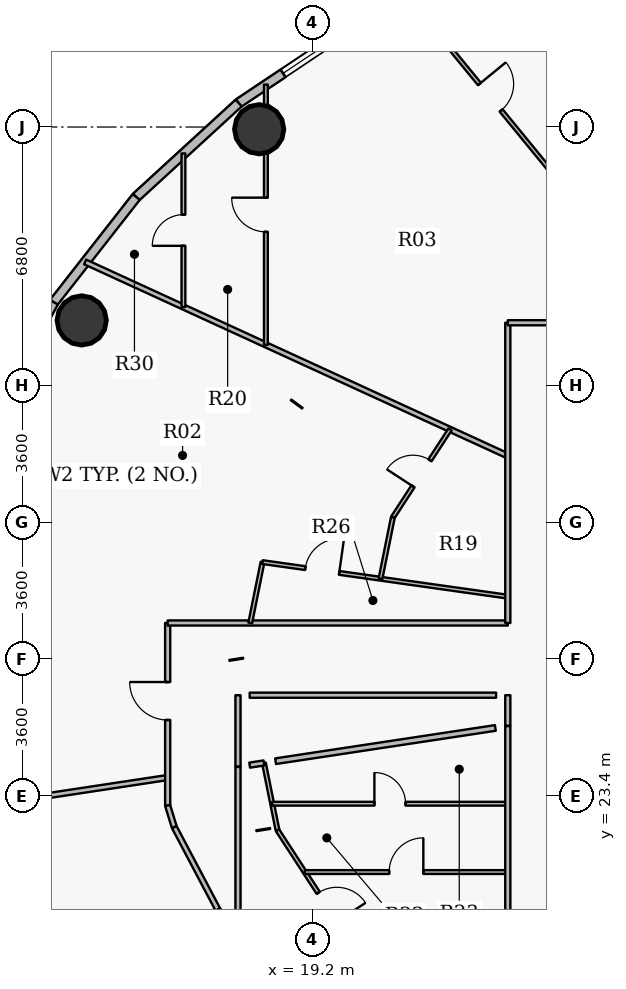
"""IFC4 building model, lengths in metres.
Left out: names, types, materials, properties, quantities, classifications, styles, units other than length and angle.
Written with IfcOpenShell. Run it as: python <this file> out.ifc"""

import sys

from ifc_helpers import new_model, si_unit, direction, frame, frame_2d, origin, origin_2d, place, context, subcontext, project, spatial, rectangle, hollow_circle, extrude, source, transform, mapped, element, fill, save


model = new_model("IFC4")
c1 = context("Model", 3, precision=1e-05, world=origin(), true_north=direction((0.0, 1.0)))
c2 = subcontext(c1, "Body", "Model", "MODEL_VIEW")
j1 = project(units=[si_unit("LENGTHUNIT", "METRE"), si_unit("PLANEANGLEUNIT", "RADIAN")], contexts=[c1])
p1 = place(None, origin())
s1 = spatial("IfcSite", under=j1, at=p1, CompositionType="ELEMENT")
p2 = place(p1, origin())
s2 = spatial("IfcBuilding", under=s1, at=p2, CompositionType="ELEMENT")
p3 = place(p2, frame((0.0, 0.0, 156.15)))
s3 = spatial("IfcBuildingStorey", under=s2, at=p3, CompositionType="ELEMENT", Elevation=156.15)
for number, where, z_axis, x_axis in (
    (1, (17.808, 40.942, 0.0), (0.0, 0.0, 1.0), (1.0, 0.0, 0.0)),
    (2, (13.137, 35.911, 0.0), (0.0, 0.0, 1.0), (1.0, 0.0, 0.0)),
):
    element("IfcColumn", number, at=place(p3, frame(where, z_axis=z_axis, x_axis=x_axis)), inside=s3, PredefinedType="COLUMN", context=c2, shape_type="SweptSolid", body=[
        extrude(hollow_circle(Radius=0.65, WallThickness=0.04, at=origin_2d()), origin(), (0.0, 0.0, 1.0), 3.75),
    ])
p4 = place(p3, frame((17.268, 41.631, 0.0), z_axis=(0.0, 0.0, 1.0), x_axis=(0.831228998277, 0.555930168657, 0.0)))
e3 = element("IfcWall", 3, at=p4, inside=s3, PredefinedType="SOLIDWALL", context=c2, shape_type="SweptSolid", body=[
    extrude(rectangle(XDim=3.8, YDim=0.24, at=frame_2d((1.9, 0.0))), origin(), (0.0, 0.0, 1.0), 3.5),
])
p5 = place(p4, frame((1.405, 0.0, 0.9)))
e4 = element("IfcOpeningElement", 4, at=p5, cuts=e3, PredefinedType="OPENING", context=c2, shape_type="SweptSolid", body=[
    extrude(rectangle(XDim=1.25, YDim=1.65, at=origin_2d()), frame((0.625, 0.13, 0.825), z_axis=(0.0, -1.0, 0.0), x_axis=(1.0, 0.0, 0.0)), (0.0, 0.0, 1.0), 0.26),
])
p6 = place(p3, frame((14.572, 39.158, 0.0), z_axis=(0.0, 0.0, 1.0), x_axis=(0.737076565834, 0.675809245349, 0.0)))
e5 = element("IfcWall", 5, at=p6, inside=s3, PredefinedType="SOLIDWALL", context=c2, shape_type="SweptSolid", body=[
    extrude(rectangle(XDim=3.658, YDim=0.24, at=frame_2d((1.829, 0.0))), origin(), (0.0, 0.0, 1.0), 3.5),
])
p7 = place(p3, frame((12.404, 36.388, 0.0), z_axis=(0.0, 0.0, 1.0), x_axis=(0.616287674549, 0.787521112224, 0.0)))
e6 = element("IfcWall", 6, at=p7, inside=s3, PredefinedType="SOLIDWALL", context=c2, shape_type="SweptSolid", body=[
    extrude(rectangle(XDim=3.517, YDim=0.24, at=frame_2d((1.759, 0.0))), origin(), (0.0, 0.0, 1.0), 3.5),
])
p8 = place(p3, frame((10.817, 33.389, 0.0), z_axis=(0.0, 0.0, 1.0), x_axis=(0.467586874938, 0.88394712194, 0.0)))
e7 = element("IfcWall", 7, at=p8, inside=s3, PredefinedType="SOLIDWALL", context=c2, shape_type="SweptSolid", body=[
    extrude(rectangle(XDim=3.393, YDim=0.24, at=frame_2d((1.697, 0.0))), origin(), (0.0, 0.0, 1.0), 3.5),
])
p9 = place(p8, frame((1.172, 0.0, 0.0)))
e8 = element("IfcOpeningElement", 8, at=p9, cuts=e7, PredefinedType="OPENING", context=c2, shape_type="SweptSolid", body=[
    extrude(rectangle(XDim=1.05, YDim=2.15, at=origin_2d()), frame((0.525, 0.13, 1.075), z_axis=(0.0, -1.0, 0.0), x_axis=(1.0, 0.0, 0.0)), (0.0, 0.0, 1.0), 0.26),
])
p10 = place(p3, frame((12.404, 17.612, 0.0), z_axis=(0.0, 0.0, 1.0), x_axis=(-0.467586874938, 0.88394712194, 0.0)))
e9 = element("IfcWall", 9, at=p10, inside=s3, PredefinedType="SOLIDWALL", context=c2, shape_type="SweptSolid", body=[
    extrude(rectangle(XDim=3.393, YDim=0.24, at=frame_2d((1.697, 0.0))), origin(), (0.0, 0.0, 1.0), 3.5),
])
p11 = place(p10, frame((1.072, 0.0, 0.9)))
e10 = element("IfcOpeningElement", 10, at=p11, cuts=e9, PredefinedType="OPENING", context=c2, shape_type="SweptSolid", body=[
    extrude(rectangle(XDim=1.25, YDim=1.65, at=origin_2d()), frame((0.625, 0.13, 0.825), z_axis=(0.0, -1.0, 0.0), x_axis=(1.0, 0.0, 0.0)), (0.0, 0.0, 1.0), 0.26),
])
p12 = place(p3, frame((10.057, 23.075, 0.0), z_axis=(0.0, 0.0, 1.0), x_axis=(0.988756022356, 0.14953771516, 0.0)))
e11 = element("IfcWall", 11, at=p12, inside=s3, PredefinedType="PARTITIONING", context=c2, shape_type="SweptSolid", body=[
    extrude(rectangle(XDim=5.404, YDim=0.135, at=frame_2d((2.702, 0.0))), origin(), (0.0, 0.0, 1.0), 2.935),
])
p13 = place(p3, frame((13.229, 37.45, 0.0), z_axis=(0.0, 0.0, 1.0), x_axis=(0.908867611309, -0.417084721746, 0.0)))
e12 = element("IfcWall", 12, at=p13, inside=s3, PredefinedType="PARTITIONING", context=c2, shape_type="SweptSolid", body=[
    extrude(rectangle(XDim=12.237, YDim=0.135, at=frame_2d((6.118, 0.0))), origin(), (0.0, 0.0, 1.0), 2.935),
])
p14 = place(p3, frame((15.4, 23.146, 0.0), z_axis=(0.0, 0.0, 1.0), x_axis=(0.0, 1.0, 0.0)))
e13 = element("IfcWall", 13, at=p14, inside=s3, PredefinedType="PARTITIONING", context=c2, shape_type="SweptSolid", body=[
    extrude(rectangle(XDim=4.804, YDim=0.135, at=frame_2d((2.402, 0.0))), origin(), (0.0, 0.0, 1.0), 2.935),
])
p15 = place(p14, frame((2.251, 0.0, 0.0)))
e14 = element("IfcOpeningElement", 14, at=p15, cuts=e13, PredefinedType="OPENING", context=c2, shape_type="SweptSolid", body=[
    extrude(rectangle(XDim=1.0, YDim=2.15, at=origin_2d()), frame((0.5, 0.078, 1.075), z_axis=(0.0, -1.0, 0.0), x_axis=(1.0, 0.0, 0.0)), (0.0, 0.0, 1.0), 0.155),
])
p16 = place(p3, frame((15.4, 23.146, 0.0), z_axis=(0.0, 0.0, 1.0), x_axis=(0.293335154151, -0.956009669061, 0.0)))
e15 = element("IfcWall", 15, at=p16, inside=s3, PredefinedType="PARTITIONING", context=c2, shape_type="SweptSolid", body=[
    extrude(rectangle(XDim=0.594, YDim=0.135, at=frame_2d((0.297, 0.0))), origin(), (0.0, 0.0, 1.0), 3.5),
])
p17 = place(p3, frame((15.4, 27.95, 0.0), z_axis=(0.0, 0.0, 1.0), x_axis=(1.0, 0.0, 0.0)))
e16 = element("IfcWall", 16, at=p17, inside=s3, PredefinedType="PARTITIONING", context=c2, shape_type="SweptSolid", body=[
    extrude(rectangle(XDim=8.95, YDim=0.135, at=frame_2d((4.475, 0.0))), origin(), (0.0, 0.0, 1.0), 3.5),
])
p18 = place(p3, frame((15.574, 22.578, 0.0), z_axis=(0.0, 0.0, 1.0), x_axis=(0.46757196543, -0.883955008552, 0.0)))
e17 = element("IfcWall", 17, at=p18, inside=s3, PredefinedType="PARTITIONING", context=c2, shape_type="SweptSolid", body=[
    extrude(rectangle(XDim=2.451, YDim=0.135, at=frame_2d((1.226, 0.0))), origin(), (0.0, 0.0, 1.0), 2.935),
])
p19 = place(p3, frame((15.815, 36.263, 0.0), z_axis=(0.0, 0.0, 1.0), x_axis=(0.0, 1.0, 0.0)))
e18 = element("IfcWall", 18, at=p19, inside=s3, PredefinedType="PARTITIONING", context=c2, shape_type="SweptSolid", body=[
    extrude(rectangle(XDim=4.042, YDim=0.1, at=frame_2d((2.021, 0.0))), origin(), (0.0, 0.0, 1.0), 2.935),
])
p20 = place(p19, frame((1.611, 0.0, 0.0)))
e19 = element("IfcOpeningElement", 19, at=p20, cuts=e18, PredefinedType="OPENING", context=c2, shape_type="SweptSolid", body=[
    extrude(rectangle(XDim=0.82, YDim=2.1, at=origin_2d()), frame((0.41, 0.06, 1.05), z_axis=(0.0, -1.0, 0.0), x_axis=(1.0, 0.0, 0.0)), (0.0, 0.0, 1.0), 0.12),
])
p21 = place(p3, frame((16.72, 20.411, 0.0), z_axis=(0.0, 0.0, 1.0), x_axis=(0.616377221056, -0.787451027914, 0.0)))
e20 = element("IfcWall", 20, at=p21, inside=s3, PredefinedType="PARTITIONING", context=c2, shape_type="SweptSolid", body=[
    extrude(rectangle(XDim=0.859, YDim=0.135, at=frame_2d((0.43, 0.0))), origin(), (0.0, 0.0, 1.0), 3.5),
])
p22 = place(p3, frame((17.25, 19.734, 0.0), z_axis=(0.0, 0.0, 1.0), x_axis=(0.0, 1.0, 0.0)))
e21 = element("IfcWall", 21, at=p22, inside=s3, PredefinedType="PARTITIONING", context=c2, shape_type="SweptSolid", body=[
    extrude(rectangle(XDim=4.429, YDim=0.135, at=frame_2d((2.215, 0.0))), origin(), (0.0, 0.0, 1.0), 2.935),
])
p23 = place(p3, frame((17.572, 27.95, 0.0), z_axis=(0.0, 0.0, 1.0), x_axis=(0.19821259699, 0.98015905158, 0.0)))
e22 = element("IfcWall", 22, at=p23, inside=s3, PredefinedType="PARTITIONING", context=c2, shape_type="SweptSolid", body=[
    extrude(rectangle(XDim=1.635, YDim=0.1, at=frame_2d((0.817, 0.0))), origin(), (0.0, 0.0, 1.0), 3.5),
])
p24 = place(p3, frame((17.896, 29.552, 0.0), z_axis=(0.0, 0.0, 1.0), x_axis=(0.990212218954, -0.139569915938, 0.0)))
e23 = element("IfcWall", 23, at=p24, inside=s3, PredefinedType="PARTITIONING", context=c2, shape_type="SweptSolid", body=[
    extrude(rectangle(XDim=6.518, YDim=0.1, at=frame_2d((3.259, 0.0))), origin(), (0.0, 0.0, 1.0), 3.5),
])
p25 = place(p24, frame((1.137, 0.0, 0.0)))
e24 = element("IfcOpeningElement", 24, at=p25, cuts=e23, PredefinedType="OPENING", context=c2, shape_type="SweptSolid", body=[
    extrude(rectangle(XDim=0.9, YDim=2.1, at=origin_2d()), frame((0.45, 0.06, 1.05), z_axis=(0.0, -1.0, 0.0), x_axis=(1.0, 0.0, 0.0)), (0.0, 0.0, 1.0), 0.12),
])
p26 = place(p3, frame((17.933, 24.267, 0.0), z_axis=(0.0, 0.0, 1.0), x_axis=(0.198166528342, -0.980168366682, 0.0)))
e25 = element("IfcWall", 25, at=p26, inside=s3, PredefinedType="PARTITIONING", context=c2, shape_type="SweptSolid", body=[
    extrude(rectangle(XDim=1.809, YDim=0.1, at=frame_2d((0.904, 0.0))), origin(), (0.0, 0.0, 1.0), 2.935),
])
p27 = place(p3, frame((17.984, 35.267, 0.0), z_axis=(0.0, 0.0, 1.0), x_axis=(0.0, 1.0, 0.0)))
e26 = element("IfcWall", 26, at=p27, inside=s3, PredefinedType="PARTITIONING", context=c2, shape_type="SweptSolid", body=[
    extrude(rectangle(XDim=6.848, YDim=0.1, at=frame_2d((3.424, 0.0))), origin(), (0.0, 0.0, 1.0), 2.935),
])
p28 = place(p27, frame((2.974, 0.0, 0.0)))
e27 = element("IfcOpeningElement", 27, at=p28, cuts=e26, PredefinedType="OPENING", context=c2, shape_type="SweptSolid", body=[
    extrude(rectangle(XDim=0.9, YDim=2.1, at=origin_2d()), frame((0.45, 0.06, 1.05), z_axis=(0.0, -1.0, 0.0), x_axis=(1.0, 0.0, 0.0)), (0.0, 0.0, 1.0), 0.12),
])
p29 = place(p3, frame((18.15, 23.195, 0.0), z_axis=(0.0, 0.0, 1.0), x_axis=(1.0, 0.0, 0.0)))
e28 = element("IfcWall", 28, at=p29, inside=s3, PredefinedType="PARTITIONING", context=c2, shape_type="SweptSolid", body=[
    extrude(rectangle(XDim=6.2, YDim=0.1, at=frame_2d((3.1, 0.0))), origin(), (0.0, 0.0, 1.0), 2.935),
])
p30 = place(p29, frame((2.69, 0.0, 0.0)))
e29 = element("IfcOpeningElement", 29, at=p30, cuts=e28, PredefinedType="OPENING", context=c2, shape_type="SweptSolid", body=[
    extrude(rectangle(XDim=0.82, YDim=2.1, at=origin_2d()), frame((0.41, 0.06, 1.05), z_axis=(0.0, -1.0, 0.0), x_axis=(1.0, 0.0, 0.0)), (0.0, 0.0, 1.0), 0.12),
])
p31 = place(p3, frame((18.291, 22.494, 0.0), z_axis=(0.0, 0.0, 1.0), x_axis=(0.545405921784, -0.838172047066, 0.0)))
e30 = element("IfcWall", 30, at=p31, inside=s3, PredefinedType="PARTITIONING", context=c2, shape_type="SweptSolid", body=[
    extrude(rectangle(XDim=4.849, YDim=0.1, at=frame_2d((2.425, 0.0))), origin(), (0.0, 0.0, 1.0), 2.935),
])
p32 = place(p31, frame((1.962, 0.0, 0.0)))
e31 = element("IfcOpeningElement", 31, at=p32, cuts=e30, PredefinedType="OPENING", context=c2, shape_type="SweptSolid", body=[
    extrude(rectangle(XDim=0.9, YDim=2.1, at=origin_2d()), frame((0.45, 0.06, 1.05), z_axis=(0.0, -1.0, 0.0), x_axis=(1.0, 0.0, 0.0)), (0.0, 0.0, 1.0), 0.12),
])
p33 = place(p3, frame((19.005, 21.397, 0.0), z_axis=(0.0, 0.0, 1.0), x_axis=(1.0, 0.0, 0.0)))
e32 = element("IfcWall", 32, at=p33, inside=s3, PredefinedType="PARTITIONING", context=c2, shape_type="SweptSolid", body=[
    extrude(rectangle(XDim=5.345, YDim=0.1, at=frame_2d((2.672, 0.0))), origin(), (0.0, 0.0, 1.0), 3.5),
])
p34 = place(p33, frame((2.222, 0.0, 0.0)))
e33 = element("IfcOpeningElement", 33, at=p34, cuts=e32, PredefinedType="OPENING", context=c2, shape_type="SweptSolid", body=[
    extrude(rectangle(XDim=0.9, YDim=2.1, at=origin_2d()), frame((0.45, 0.06, 1.05), z_axis=(0.0, -1.0, 0.0), x_axis=(1.0, 0.0, 0.0)), (0.0, 0.0, 1.0), 0.12),
])
p35 = place(p3, frame((21.0, 29.115, 0.0), z_axis=(0.0, 0.0, 1.0), x_axis=(0.198219197437, 0.980157716782, 0.0)))
e34 = element("IfcWall", 34, at=p35, inside=s3, PredefinedType="PARTITIONING", context=c2, shape_type="SweptSolid", body=[
    extrude(rectangle(XDim=1.652, YDim=0.1, at=frame_2d((0.826, 0.0))), origin(), (0.0, 0.0, 1.0), 3.5),
])
p36 = place(p3, frame((21.327, 30.733, 0.0), z_axis=(0.0, 0.0, 1.0), x_axis=(0.545365017792, 0.838198662233, 0.0)))
e35 = element("IfcWall", 35, at=p36, inside=s3, PredefinedType="PARTITIONING", context=c2, shape_type="SweptSolid", body=[
    extrude(rectangle(XDim=2.756, YDim=0.1, at=frame_2d((1.378, 0.0))), origin(), (0.0, 0.0, 1.0), 2.935),
])
p37 = place(p36, frame((0.968, 0.0, 0.0)))
e36 = element("IfcOpeningElement", 36, at=p37, cuts=e35, PredefinedType="OPENING", context=c2, shape_type="SweptSolid", body=[
    extrude(rectangle(XDim=0.82, YDim=2.1, at=origin_2d()), frame((0.41, 0.06, 1.05), z_axis=(0.0, -1.0, 0.0), x_axis=(1.0, 0.0, 0.0)), (0.0, 0.0, 1.0), 0.12),
])
p38 = place(p3, frame((21.756, 44.387, 0.0), z_axis=(0.0, 0.0, 1.0), x_axis=(0.633727642201, -0.773556252325, 0.0)))
e37 = element("IfcWall", 37, at=p38, inside=s3, PredefinedType="PARTITIONING", context=c2, shape_type="SweptSolid", body=[
    extrude(rectangle(XDim=6.729, YDim=0.1, at=frame_2d((3.365, 0.0))), origin(), (0.0, 0.0, 1.0), 2.935),
])
p39 = place(p38, frame((2.915, 0.0, 0.0)))
e38 = element("IfcOpeningElement", 38, at=p39, cuts=e37, PredefinedType="OPENING", context=c2, shape_type="SweptSolid", body=[
    extrude(rectangle(XDim=0.9, YDim=2.1, at=origin_2d()), frame((0.45, 0.06, 1.05), z_axis=(0.0, -1.0, 0.0), x_axis=(1.0, 0.0, 0.0)), (0.0, 0.0, 1.0), 0.12),
])
p40 = place(p3, frame((24.35, 18.15, 0.0), z_axis=(0.0, 0.0, 1.0), x_axis=(0.0, 1.0, 0.0)))
e39 = element("IfcWall", 39, at=p40, inside=s3, PredefinedType="PARTITIONING", context=c2, shape_type="SweptSolid", body=[
    extrude(rectangle(XDim=7.088, YDim=0.135, at=frame_2d((3.544, 0.0))), origin(), (0.0, 0.0, 1.0), 2.935),
])
p41 = place(p3, frame((24.35, 27.95, 0.0), z_axis=(0.0, 0.0, 1.0), x_axis=(0.0, 1.0, 0.0)))
e40 = element("IfcWall", 40, at=p41, inside=s3, PredefinedType="PARTITIONING", context=c2, shape_type="SweptSolid", body=[
    extrude(rectangle(XDim=7.9, YDim=0.135, at=frame_2d((3.95, 0.0))), origin(), (0.0, 0.0, 1.0), 2.935),
])
p42 = place(p3, frame((24.35, 35.85, 0.0), z_axis=(0.0, 0.0, 1.0), x_axis=(1.0, 0.0, 0.0)))
e41 = element("IfcWall", 41, at=p42, inside=s3, PredefinedType="PARTITIONING", context=c2, shape_type="SweptSolid", body=[
    extrude(rectangle(XDim=29.104, YDim=0.135, at=frame_2d((14.552, 0.0))), origin(), (0.0, 0.0, 1.0), 2.935),
])
p43 = place(p42, frame((15.972, 0.0, 0.0)))
e42 = element("IfcOpeningElement", 42, at=p43, cuts=e41, PredefinedType="OPENING", context=c2, shape_type="SweptSolid", body=[
    extrude(rectangle(XDim=1.0, YDim=2.15, at=origin_2d()), frame((0.5, 0.078, 1.075), z_axis=(0.0, -1.0, 0.0), x_axis=(1.0, 0.0, 0.0)), (0.0, 0.0, 1.0), 0.155),
])
p44 = place(p42, frame((4.074, 0.0, 0.0)))
e43 = element("IfcOpeningElement", 43, at=p44, cuts=e41, PredefinedType="OPENING", context=c2, shape_type="SweptSolid", body=[
    extrude(rectangle(XDim=1.0, YDim=2.15, at=origin_2d()), frame((0.5, 0.078, 1.075), z_axis=(0.0, -1.0, 0.0), x_axis=(1.0, 0.0, 0.0)), (0.0, 0.0, 1.0), 0.155),
])
p45 = place(p3, frame((17.25, 26.05, 0.0), z_axis=(0.0, 0.0, 1.0), x_axis=(0.0, -1.0, 0.0)))
e44 = element("IfcWall", 44, at=p45, inside=s3, PredefinedType="PARTITIONING", context=c2, shape_type="SweptSolid", body=[
    extrude(rectangle(XDim=1.876, YDim=0.135, at=frame_2d((0.938, 0.0))), origin(), (0.0, 0.0, 1.0), 3.185),
])
p46 = place(p3, frame((24.35, 25.248, 0.0), z_axis=(0.0, 0.0, 1.0), x_axis=(0.0, 1.0, 0.0)))
e45 = element("IfcWall", 45, at=p46, inside=s3, PredefinedType="PARTITIONING", context=c2, shape_type="SweptSolid", body=[
    extrude(rectangle(XDim=0.802, YDim=0.135, at=frame_2d((0.401, 0.0))), origin(), (0.0, 0.0, 1.0), 3.5),
])
p47 = place(p3, frame((24.042, 26.05, 0.0), z_axis=(0.0, 0.0, 1.0), x_axis=(-1.0, 0.0, 0.0)))
e46 = element("IfcWall", 46, at=p47, inside=s3, PredefinedType="PARTITIONING", context=c2, shape_type="SweptSolid", body=[
    extrude(rectangle(XDim=6.485, YDim=0.135, at=frame_2d((3.242, 0.0))), origin(), (0.0, 0.0, 1.0), 3.5),
])
p48 = place(p3, frame((17.558, 24.21, 0.0), z_axis=(0.0, 0.0, 1.0), x_axis=(0.988703952477, 0.149881601124, 0.0)))
e47 = element("IfcWall", 47, at=p48, inside=s3, PredefinedType="PARTITIONING", context=c2, shape_type="SweptSolid", body=[
    extrude(rectangle(XDim=0.38, YDim=0.135, at=frame_2d((0.19, 0.0))), origin(), (0.0, 0.0, 1.0), 3.185),
])
p49 = place(p3, frame((18.24, 24.313, 0.0), z_axis=(0.0, 0.0, 1.0), x_axis=(0.988751262043, 0.149569187364, 0.0)))
e48 = element("IfcWall", 48, at=p49, inside=s3, PredefinedType="PARTITIONING", context=c2, shape_type="SweptSolid", body=[
    extrude(rectangle(XDim=5.848, YDim=0.15, at=frame_2d((2.924, 0.0))), origin(), (0.0, 0.0, 1.0), 3.5),
])
m1 = source(origin(), c2, "Body", "SweptSolid", [
    extrude(rectangle(XDim=1.25, YDim=1.65, at=origin_2d()), frame((0.625, 0.03, 0.825), z_axis=(0.0, -1.0, 0.0), x_axis=(1.0, 0.0, 0.0)), (0.0, 0.0, 1.0), 0.06),
])
p50 = place(p5, origin())
e49 = element("IfcWindow", 49, at=p50, inside=s3, PartitioningType="SINGLE_PANEL", PredefinedType="WINDOW", context=c2, shape_type="MappedRepresentation", body=[
    mapped(m1, transform((0.0, 0.0, 0.0), x_axis=(1.0, 0.0, 0.0), y_axis=(0.0, 1.0, 0.0), z_axis=(0.0, 0.0, 1.0), scale=1.0)),
])
fill(e4, e49)
m2 = source(origin(), c2, "Body", "SweptSolid", [
    extrude(rectangle(XDim=0.9, YDim=2.1, at=origin_2d()), frame((0.45, 0.025, 1.05), z_axis=(0.0, -1.0, 0.0), x_axis=(1.0, 0.0, 0.0)), (0.0, 0.0, 1.0), 0.05),
])
p51 = place(p39, origin())
e50 = element("IfcDoor", 50, at=p51, inside=s3, OperationType="SINGLE_SWING_LEFT", PredefinedType="DOOR", context=c2, shape_type="MappedRepresentation", body=[
    mapped(m2, transform((0.0, 0.0, 0.0), x_axis=(1.0, 0.0, 0.0), y_axis=(0.0, 1.0, 0.0), z_axis=(0.0, 0.0, 1.0), scale=1.0)),
])
fill(e38, e50)
p52 = place(p28, origin())
e51 = element("IfcDoor", 51, at=p52, inside=s3, OperationType="SINGLE_SWING_RIGHT", PredefinedType="DOOR", context=c2, shape_type="MappedRepresentation", body=[
    mapped(m2, transform((0.0, 0.0, 0.0), x_axis=(1.0, 0.0, 0.0), y_axis=(0.0, 1.0, 0.0), z_axis=(0.0, 0.0, 1.0), scale=1.0)),
])
fill(e27, e51)
m3 = source(origin(), c2, "Body", "SweptSolid", [
    extrude(rectangle(XDim=0.82, YDim=2.1, at=origin_2d()), frame((0.41, 0.025, 1.05), z_axis=(0.0, -1.0, 0.0), x_axis=(1.0, 0.0, 0.0)), (0.0, 0.0, 1.0), 0.05),
])
p53 = place(p20, origin())
e52 = element("IfcDoor", 52, at=p53, inside=s3, OperationType="SINGLE_SWING_LEFT", PredefinedType="DOOR", context=c2, shape_type="MappedRepresentation", body=[
    mapped(m3, transform((0.0, 0.0, 0.0), x_axis=(1.0, 0.0, 0.0), y_axis=(0.0, 1.0, 0.0), z_axis=(0.0, 0.0, 1.0), scale=1.0)),
])
fill(e19, e52)
m4 = source(origin(), c2, "Body", "SweptSolid", [
    extrude(rectangle(XDim=1.0, YDim=2.15, at=origin_2d()), frame((0.5, 0.025, 1.075), z_axis=(0.0, -1.0, 0.0), x_axis=(1.0, 0.0, 0.0)), (0.0, 0.0, 1.0), 0.05),
])
p54 = place(p15, origin())
e53 = element("IfcDoor", 53, at=p54, inside=s3, OperationType="SINGLE_SWING_RIGHT", PredefinedType="DOOR", context=c2, shape_type="MappedRepresentation", body=[
    mapped(m4, transform((0.0, 0.0, 0.0), x_axis=(1.0, 0.0, 0.0), y_axis=(0.0, 1.0, 0.0), z_axis=(0.0, 0.0, 1.0), scale=1.0)),
])
fill(e14, e53)
p55 = place(p37, origin())
e54 = element("IfcDoor", 54, at=p55, inside=s3, OperationType="SINGLE_SWING_LEFT", PredefinedType="DOOR", context=c2, shape_type="MappedRepresentation", body=[
    mapped(m3, transform((0.0, 0.0, 0.0), x_axis=(1.0, 0.0, 0.0), y_axis=(0.0, 1.0, 0.0), z_axis=(0.0, 0.0, 1.0), scale=1.0)),
])
fill(e36, e54)
p56 = place(p25, origin())
e55 = element("IfcDoor", 55, at=p56, inside=s3, OperationType="SINGLE_SWING_RIGHT", PredefinedType="DOOR", context=c2, shape_type="MappedRepresentation", body=[
    mapped(m2, transform((0.0, 0.0, 0.0), x_axis=(1.0, 0.0, 0.0), y_axis=(0.0, 1.0, 0.0), z_axis=(0.0, 0.0, 1.0), scale=1.0)),
])
fill(e24, e55)
p57 = place(p32, origin())
e56 = element("IfcDoor", 56, at=p57, inside=s3, OperationType="SINGLE_SWING_RIGHT", PredefinedType="DOOR", context=c2, shape_type="MappedRepresentation", body=[
    mapped(m2, transform((0.0, 0.0, 0.0), x_axis=(1.0, 0.0, 0.0), y_axis=(0.0, 1.0, 0.0), z_axis=(0.0, 0.0, 1.0), scale=1.0)),
])
fill(e31, e56)
p58 = place(p34, origin())
e57 = element("IfcDoor", 57, at=p58, inside=s3, OperationType="SINGLE_SWING_RIGHT", PredefinedType="DOOR", context=c2, shape_type="MappedRepresentation", body=[
    mapped(m2, transform((0.0, 0.0, 0.0), x_axis=(1.0, 0.0, 0.0), y_axis=(0.0, 1.0, 0.0), z_axis=(0.0, 0.0, 1.0), scale=1.0)),
])
fill(e33, e57)
p59 = place(p30, origin())
e58 = element("IfcDoor", 58, at=p59, inside=s3, OperationType="SINGLE_SWING_LEFT", PredefinedType="DOOR", context=c2, shape_type="MappedRepresentation", body=[
    mapped(m3, transform((0.0, 0.0, 0.0), x_axis=(1.0, 0.0, 0.0), y_axis=(0.0, 1.0, 0.0), z_axis=(0.0, 0.0, 1.0), scale=1.0)),
])
fill(e29, e58)
save(model, sys.argv[1])
